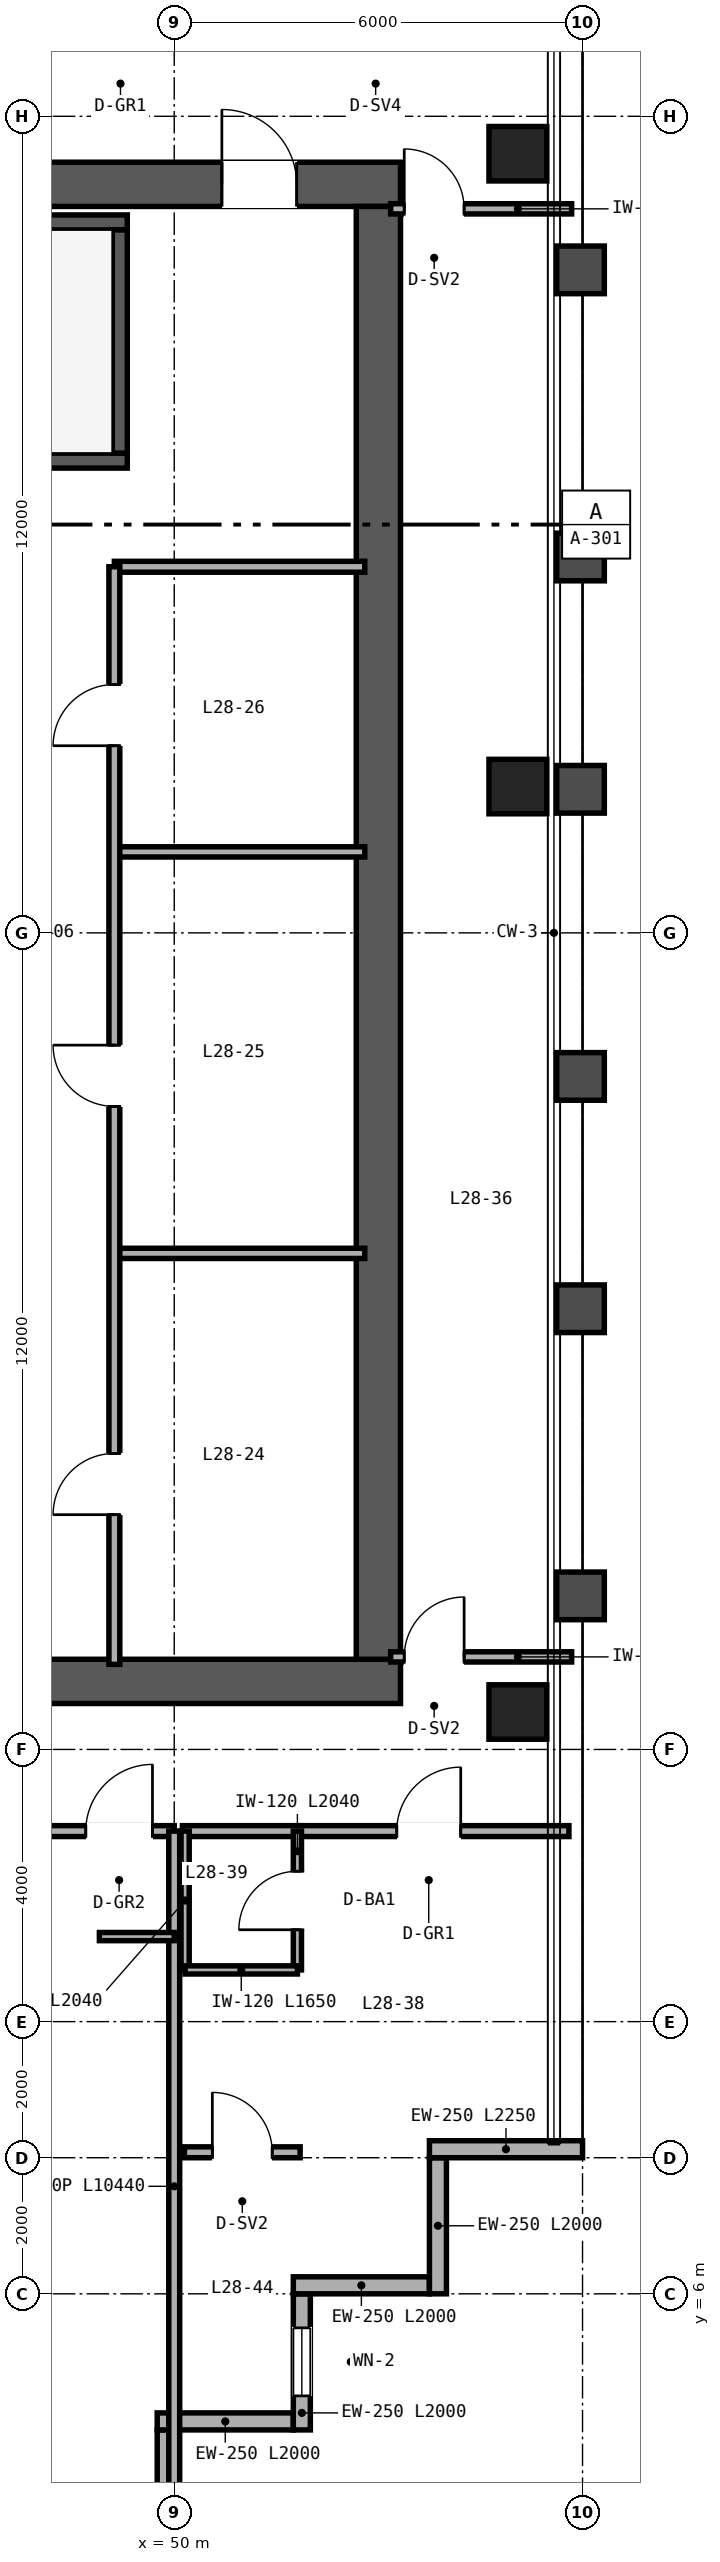
"""IFC4 building model, lengths in metres.
Left out: names, types, materials, properties, quantities, classifications, styles, units other than length and angle.
Written with IfcOpenShell. Run it as: python <this file> out.ifc"""

import sys

from ifc_helpers import new_model, si_unit, direction, frame, frame_2d, origin, origin_2d, place, context, subcontext, project, spatial, rectangle, hollow_rectangle, extrude, source, transform, mapped, element, fill, save


model = new_model("IFC4")
c1 = context("Model", 3, precision=1e-05, world=origin(), true_north=direction((0.0, 1.0)))
c2 = subcontext(c1, "Body", "Model", "MODEL_VIEW")
j1 = project(units=[si_unit("LENGTHUNIT", "METRE"), si_unit("PLANEANGLEUNIT", "RADIAN")], contexts=[c1])
p1 = place(None, origin())
s1 = spatial("IfcSite", under=j1, at=p1, CompositionType="ELEMENT")
p2 = place(p1, origin())
s2 = spatial("IfcBuilding", under=s1, at=p2, CompositionType="ELEMENT")
p3 = place(p2, frame((0.0, 0.0, 115.2)))
s3 = spatial("IfcBuildingStorey", under=s2, at=p3, CompositionType="ELEMENT", Elevation=115.2)
p4 = place(p3, frame((40.675, 15.0, 0.0), z_axis=(0.0, 0.0, 1.0), x_axis=(1.0, 0.0, 0.0)))
e1 = element("IfcWall", 1, at=p4, inside=s3, PredefinedType="SHEAR", context=c2, shape_type="SweptSolid", body=[
    extrude(rectangle(XDim=12.65, YDim=0.65, at=frame_2d((6.325, 0.0))), origin(), (0.0, 0.0, 1.0), 3.36),
])
p5 = place(p4, frame((4.425, 0.0, 0.0)))
e2 = element("IfcOpeningElement", 2, at=p5, cuts=e1, PredefinedType="OPENING", context=c2, shape_type="SweptSolid", body=[
    extrude(rectangle(XDim=1.0, YDim=2.15, at=frame_2d((0.5, 1.075))), frame((0.0, 0.335, 0.0), z_axis=(0.0, -1.0, 0.0), x_axis=(1.0, 0.0, 0.0)), (0.0, 0.0, 1.0), 0.67),
])
p6 = place(p3, frame((40.675, 37.0, 0.0), z_axis=(0.0, 0.0, 1.0), x_axis=(1.0, 0.0, 0.0)))
e3 = element("IfcWall", 3, at=p6, inside=s3, PredefinedType="SHEAR", context=c2, shape_type="SweptSolid", body=[
    extrude(rectangle(XDim=12.65, YDim=0.65, at=frame_2d((6.325, 0.0))), origin(), (0.0, 0.0, 1.0), 3.36),
])
p7 = place(p6, frame((10.025, 0.0, 0.0)))
e4 = element("IfcOpeningElement", 4, at=p7, cuts=e3, PredefinedType="OPENING", context=c2, shape_type="SweptSolid", body=[
    extrude(rectangle(XDim=1.1, YDim=2.15, at=frame_2d((0.55, 1.075))), frame((0.0, 0.335, 0.0), z_axis=(0.0, -1.0, 0.0), x_axis=(1.0, 0.0, 0.0)), (0.0, 0.0, 1.0), 0.67),
])
p8 = place(p3, frame((53.0, 15.325, 0.0), z_axis=(0.0, 0.0, 1.0), x_axis=(0.0, 1.0, 0.0)))
e5 = element("IfcWall", 5, at=p8, inside=s3, PredefinedType="SHEAR", context=c2, shape_type="SweptSolid", body=[
    extrude(rectangle(XDim=21.35, YDim=0.65, at=frame_2d((10.675, 0.0))), origin(), (0.0, 0.0, 1.0), 3.36),
])
p9 = place(p3, frame((41.325, 32.94, 0.0), z_axis=(0.0, 0.0, 1.0), x_axis=(1.0, 0.0, 0.0)))
e6 = element("IfcWall", 6, at=p9, inside=s3, PredefinedType="SHEAR", context=c2, shape_type="SweptSolid", body=[
    extrude(rectangle(XDim=7.985, YDim=0.22, at=frame_2d((3.993, 0.0))), origin(), (0.0, 0.0, 1.0), 3.4),
])
p10 = place(p9, frame((0.595, 0.0, 0.0)))
e7 = element("IfcOpeningElement", 7, at=p10, cuts=e6, PredefinedType="OPENING", context=c2, shape_type="SweptSolid", body=[
    extrude(rectangle(XDim=1.05, YDim=2.15, at=frame_2d((0.525, 1.075))), frame((0.0, 0.12, 0.0), z_axis=(0.0, -1.0, 0.0), x_axis=(1.0, 0.0, 0.0)), (0.0, 0.0, 1.0), 0.24),
])
p11 = place(p3, frame((41.325, 36.44, 0.0), z_axis=(0.0, 0.0, 1.0), x_axis=(1.0, 0.0, 0.0)))
e8 = element("IfcWall", 8, at=p11, inside=s3, PredefinedType="SHEAR", context=c2, shape_type="SweptSolid", body=[
    extrude(rectangle(XDim=7.985, YDim=0.22, at=frame_2d((3.993, 0.0))), origin(), (0.0, 0.0, 1.0), 3.4),
])
p12 = place(p3, frame((49.2, 33.05, 0.0), z_axis=(0.0, 0.0, 1.0), x_axis=(0.0, 1.0, 0.0)))
e9 = element("IfcWall", 9, at=p12, inside=s3, PredefinedType="SHEAR", context=c2, shape_type="SweptSolid", body=[
    extrude(rectangle(XDim=3.28, YDim=0.22, at=frame_2d((1.64, 0.0))), origin(), (0.0, 0.0, 1.0), 3.4),
])
m1 = source(origin(), c2, "Body", "SweptSolid", [
    extrude(hollow_rectangle(XDim=0.85, YDim=0.8, WallThickness=0.032, at=origin_2d()), origin(), (0.0, 0.0, 1.0), 3.36),
])
for number, where, z_axis, x_axis in (
    (10, (55.05, 14.55, 0.0), (0.0, 0.0, 1.0), (1.0, 0.0, 0.0)),
    (11, (55.05, 28.15, 0.0), (0.0, 0.0, 1.0), (1.0, 0.0, 0.0)),
    (12, (55.05, 37.45, 0.0), (0.0, 0.0, 1.0), (1.0, 0.0, 0.0)),
):
    element("IfcColumn", number, at=place(p3, frame(where, z_axis=z_axis, x_axis=x_axis)), inside=s3, PredefinedType="COLUMN", context=c2, shape_type="MappedRepresentation", body=[
        mapped(m1, transform((0.0, 0.0, 0.0), scale=1.0)),
    ])
p13 = place(p3, frame((49.875, 2.0, 0.0), z_axis=(0.0, 0.0, 1.0), x_axis=(0.0, 1.0, 0.0)))
e13 = element("IfcWall", 13, at=p13, inside=s3, PredefinedType="SOLIDWALL", context=c2, shape_type="SweptSolid", body=[
    extrude(rectangle(XDim=2.0, YDim=0.25, at=frame_2d((1.0, 0.0))), origin(), (0.0, 0.0, 1.0), 2.667),
])
p14 = place(p3, frame((49.75, 4.125, 0.0), z_axis=(0.0, 0.0, 1.0), x_axis=(1.0, 0.0, 0.0)))
e14 = element("IfcWall", 14, at=p14, inside=s3, PredefinedType="SOLIDWALL", context=c2, shape_type="SweptSolid", body=[
    extrude(rectangle(XDim=2.0, YDim=0.25, at=frame_2d((1.0, 0.0))), origin(), (0.0, 0.0, 1.0), 3.36),
])
p15 = place(p3, frame((51.875, 4.0, 0.0), z_axis=(0.0, 0.0, 1.0), x_axis=(0.0, 1.0, 0.0)))
e15 = element("IfcWall", 15, at=p15, inside=s3, PredefinedType="SOLIDWALL", context=c2, shape_type="SweptSolid", body=[
    extrude(rectangle(XDim=2.0, YDim=0.25, at=frame_2d((1.0, 0.0))), origin(), (0.0, 0.0, 1.0), 3.36),
])
p16 = place(p15, frame((0.5, 0.0, 0.85)))
e16 = element("IfcOpeningElement", 16, at=p16, cuts=e15, PredefinedType="OPENING", context=c2, shape_type="SweptSolid", body=[
    extrude(rectangle(XDim=1.0, YDim=1.9, at=frame_2d((0.5, 0.95))), frame((0.0, 0.135, 0.0), z_axis=(0.0, -1.0, 0.0), x_axis=(1.0, 0.0, 0.0)), (0.0, 0.0, 1.0), 0.27),
])
for number, where, z_axis, x_axis in (
    (17, (51.75, 6.125, 0.0), (0.0, 0.0, 1.0), (1.0, 0.0, 0.0)),
    (18, (53.875, 6.0, 0.0), (0.0, 0.0, 1.0), (0.0, 1.0, 0.0)),
):
    element("IfcWall", number, at=place(p3, frame(where, z_axis=z_axis, x_axis=x_axis)), inside=s3, PredefinedType="SOLIDWALL", context=c2, shape_type="SweptSolid", body=[
        extrude(rectangle(XDim=2.0, YDim=0.25, at=frame_2d((1.0, 0.0))), origin(), (0.0, 0.0, 1.0), 3.36),
    ])
p17 = place(p3, frame((53.75, 8.125, 0.0), z_axis=(0.0, 0.0, 1.0), x_axis=(1.0, 0.0, 0.0)))
e19 = element("IfcWall", 19, at=p17, inside=s3, PredefinedType="SOLIDWALL", context=c2, shape_type="SweptSolid", body=[
    extrude(rectangle(XDim=2.25, YDim=0.25, at=frame_2d((1.125, 0.0))), origin(), (0.0, 0.0, 1.0), 3.36),
])
p18 = place(p3, frame((49.12, 31.38, 0.0), z_axis=(0.0, 0.0, 1.0), x_axis=(1.0, 0.0, 0.0)))
e20 = element("IfcWall", 20, at=p18, inside=s3, PredefinedType="PARTITIONING", context=c2, shape_type="SweptSolid", body=[
    extrude(rectangle(XDim=3.68, YDim=0.16, at=frame_2d((1.84, 0.0))), origin(), (0.0, 0.0, 1.0), 2.36),
])
for number, where, z_axis, x_axis in (
    (21, (49.12, 21.29, 0.0), (0.0, 0.0, 1.0), (1.0, 0.0, 0.0)),
    (22, (49.12, 27.19, 0.0), (0.0, 0.0, 1.0), (1.0, 0.0, 0.0)),
):
    element("IfcWall", number, at=place(p3, frame(where, z_axis=z_axis, x_axis=x_axis)), inside=s3, PredefinedType="PARTITIONING", context=c2, shape_type="SweptSolid", body=[
        extrude(rectangle(XDim=3.68, YDim=0.15, at=frame_2d((1.84, 0.0))), origin(), (0.0, 0.0, 1.0), 3.36),
    ])
p19 = place(p3, frame((49.12, 15.25, 0.0), z_axis=(0.0, 0.0, 1.0), x_axis=(0.0, 1.0, 0.0)))
e23 = element("IfcWall", 23, at=p19, inside=s3, PredefinedType="PARTITIONING", context=c2, shape_type="SweptSolid", body=[
    extrude(rectangle(XDim=16.13, YDim=0.16, at=frame_2d((8.065, 0.0))), origin(), (0.0, 0.0, 1.0), 2.36),
])
p20 = place(p19, frame((2.2, 0.0, 0.0)))
e24 = element("IfcOpeningElement", 24, at=p20, cuts=e23, PredefinedType="OPENING", context=c2, shape_type="SweptSolid", body=[
    extrude(rectangle(XDim=0.9, YDim=2.15, at=frame_2d((0.45, 1.075))), frame((0.0, 0.09, 0.0), z_axis=(0.0, -1.0, 0.0), x_axis=(1.0, 0.0, 0.0)), (0.0, 0.0, 1.0), 0.18),
])
p21 = place(p19, frame((8.2, 0.0, 0.0)))
e25 = element("IfcOpeningElement", 25, at=p21, cuts=e23, PredefinedType="OPENING", context=c2, shape_type="SweptSolid", body=[
    extrude(rectangle(XDim=0.9, YDim=2.15, at=frame_2d((0.45, 1.075))), frame((0.0, 0.09, 0.0), z_axis=(0.0, -1.0, 0.0), x_axis=(1.0, 0.0, 0.0)), (0.0, 0.0, 1.0), 0.18),
])
p22 = place(p19, frame((13.5, 0.0, 0.0)))
e26 = element("IfcOpeningElement", 26, at=p22, cuts=e23, PredefinedType="OPENING", context=c2, shape_type="SweptSolid", body=[
    extrude(rectangle(XDim=0.9, YDim=2.15, at=frame_2d((0.45, 1.075))), frame((0.0, 0.09, 0.0), z_axis=(0.0, -1.0, 0.0), x_axis=(1.0, 0.0, 0.0)), (0.0, 0.0, 1.0), 0.18),
])
p23 = place(p3, frame((53.18, 15.36, 0.0), z_axis=(0.0, 0.0, 1.0), x_axis=(1.0, 0.0, 0.0)))
e27 = element("IfcWall", 27, at=p23, inside=s3, PredefinedType="PARTITIONING", context=c2, shape_type="SweptSolid", body=[
    extrude(rectangle(XDim=2.66, YDim=0.15, at=frame_2d((1.33, 0.0))), origin(), (0.0, 0.0, 1.0), 2.581),
])
p24 = place(p23, frame((0.2, 0.0, 0.0)))
e28 = element("IfcOpeningElement", 28, at=p24, cuts=e27, PredefinedType="OPENING", context=c2, shape_type="SweptSolid", body=[
    extrude(rectangle(XDim=0.88, YDim=2.15, at=frame_2d((0.44, 1.075))), frame((0.0, 0.085, 0.0), z_axis=(0.0, -1.0, 0.0), x_axis=(1.0, 0.0, 0.0)), (0.0, 0.0, 1.0), 0.17),
])
p25 = place(p3, frame((53.18, 36.64, 0.0), z_axis=(0.0, 0.0, 1.0), x_axis=(1.0, 0.0, 0.0)))
e29 = element("IfcWall", 29, at=p25, inside=s3, PredefinedType="PARTITIONING", context=c2, shape_type="SweptSolid", body=[
    extrude(rectangle(XDim=2.66, YDim=0.15, at=frame_2d((1.33, 0.0))), origin(), (0.0, 0.0, 1.0), 2.743),
])
p26 = place(p25, frame((0.2, 0.0, 0.0)))
e30 = element("IfcOpeningElement", 30, at=p26, cuts=e29, PredefinedType="OPENING", context=c2, shape_type="SweptSolid", body=[
    extrude(rectangle(XDim=0.88, YDim=2.15, at=frame_2d((0.44, 1.075))), frame((0.0, 0.085, 0.0), z_axis=(0.0, -1.0, 0.0), x_axis=(1.0, 0.0, 0.0)), (0.0, 0.0, 1.0), 0.17),
])
p27 = place(p3, frame((50.12, 12.8, 0.0), z_axis=(0.0, 0.0, 1.0), x_axis=(1.0, 0.0, 0.0)))
e31 = element("IfcWall", 31, at=p27, inside=s3, PredefinedType="PARTITIONING", context=c2, shape_type="SweptSolid", body=[
    extrude(rectangle(XDim=5.68, YDim=0.16, at=frame_2d((2.84, 0.0))), origin(), (0.0, 0.0, 1.0), 3.36),
])
p28 = place(p27, frame((3.15, 0.0, 0.0)))
e32 = element("IfcOpeningElement", 32, at=p28, cuts=e31, PredefinedType="OPENING", context=c2, shape_type="SweptSolid", body=[
    extrude(rectangle(XDim=0.94, YDim=2.15, at=frame_2d((0.47, 1.075))), frame((0.0, 0.09, 0.0), z_axis=(0.0, -1.0, 0.0), x_axis=(1.0, 0.0, 0.0)), (0.0, 0.0, 1.0), 0.18),
])
p29 = place(p3, frame((51.81, 10.76, 0.0), z_axis=(0.0, 0.0, 1.0), x_axis=(0.0, 1.0, 0.0)))
e33 = element("IfcWall", 33, at=p29, inside=s3, PredefinedType="PARTITIONING", context=c2, shape_type="SweptSolid", body=[
    extrude(rectangle(XDim=2.04, YDim=0.12, at=frame_2d((1.02, 0.0))), origin(), (0.0, 0.0, 1.0), 3.36),
])
p30 = place(p29, frame((0.59, 0.0, 0.0)))
e34 = element("IfcOpeningElement", 34, at=p30, cuts=e33, PredefinedType="OPENING", context=c2, shape_type="SweptSolid", body=[
    extrude(rectangle(XDim=0.86, YDim=2.1, at=frame_2d((0.43, 1.05))), frame((0.0, 0.07, 0.0), z_axis=(0.0, -1.0, 0.0), x_axis=(1.0, 0.0, 0.0)), (0.0, 0.0, 1.0), 0.14),
])
p31 = place(p3, frame((50.16, 10.76, 0.0), z_axis=(0.0, 0.0, 1.0), x_axis=(0.0, 1.0, 0.0)))
e35 = element("IfcWall", 35, at=p31, inside=s3, PredefinedType="PARTITIONING", context=c2, shape_type="SweptSolid", body=[
    extrude(rectangle(XDim=2.04, YDim=0.12, at=frame_2d((1.02, 0.0))), origin(), (0.0, 0.0, 1.0), 3.36),
])
p32 = place(p3, frame((50.16, 10.76, 0.0), z_axis=(0.0, 0.0, 1.0), x_axis=(1.0, 0.0, 0.0)))
e36 = element("IfcWall", 36, at=p32, inside=s3, PredefinedType="PARTITIONING", context=c2, shape_type="SweptSolid", body=[
    extrude(rectangle(XDim=1.65, YDim=0.12, at=frame_2d((0.825, 0.0))), origin(), (0.0, 0.0, 1.0), 3.36),
])
p33 = place(p3, frame((50.15, 8.08, 0.0), z_axis=(0.0, 0.0, 1.0), x_axis=(1.0, 0.0, 0.0)))
e37 = element("IfcWall", 37, at=p33, inside=s3, PredefinedType="PARTITIONING", context=c2, shape_type="SweptSolid", body=[
    extrude(rectangle(XDim=1.7, YDim=0.16, at=frame_2d((0.85, 0.0))), origin(), (0.0, 0.0, 1.0), 3.36),
])
p34 = place(p33, frame((0.41, 0.0, 0.0)))
e38 = element("IfcOpeningElement", 38, at=p34, cuts=e37, PredefinedType="OPENING", context=c2, shape_type="SweptSolid", body=[
    extrude(rectangle(XDim=0.88, YDim=2.15, at=frame_2d((0.44, 1.075))), frame((0.0, 0.09, 0.0), z_axis=(0.0, -1.0, 0.0), x_axis=(1.0, 0.0, 0.0)), (0.0, 0.0, 1.0), 0.18),
])
p35 = place(p3, frame((14.0, 12.8, 0.0), z_axis=(0.0, 0.0, 1.0), x_axis=(1.0, 0.0, 0.0)))
e39 = element("IfcWall", 39, at=p35, inside=s3, PredefinedType="PARTITIONING", context=c2, shape_type="SweptSolid", body=[
    extrude(rectangle(XDim=36.0, YDim=0.16, at=frame_2d((18.0, 0.0))), origin(), (0.0, 0.0, 1.0), 2.581),
])
p36 = place(p35, frame((7.75, 0.0, 0.0)))
e40 = element("IfcOpeningElement", 40, at=p36, cuts=e39, PredefinedType="OPENING", context=c2, shape_type="SweptSolid", body=[
    extrude(rectangle(XDim=0.98, YDim=2.2, at=frame_2d((0.49, 1.1))), frame((0.0, 0.09, 0.0), z_axis=(0.0, -1.0, 0.0), x_axis=(1.0, 0.0, 0.0)), (0.0, 0.0, 1.0), 0.18),
])
p37 = place(p35, frame((16.9, 0.0, 0.0)))
e41 = element("IfcOpeningElement", 41, at=p37, cuts=e39, PredefinedType="OPENING", context=c2, shape_type="SweptSolid", body=[
    extrude(rectangle(XDim=0.98, YDim=2.2, at=frame_2d((0.49, 1.1))), frame((0.0, 0.09, 0.0), z_axis=(0.0, -1.0, 0.0), x_axis=(1.0, 0.0, 0.0)), (0.0, 0.0, 1.0), 0.18),
])
p38 = place(p35, frame((24.65, 0.0, 0.0)))
e42 = element("IfcOpeningElement", 42, at=p38, cuts=e39, PredefinedType="OPENING", context=c2, shape_type="SweptSolid", body=[
    extrude(rectangle(XDim=0.98, YDim=2.2, at=frame_2d((0.49, 1.1))), frame((0.0, 0.09, 0.0), z_axis=(0.0, -1.0, 0.0), x_axis=(1.0, 0.0, 0.0)), (0.0, 0.0, 1.0), 0.18),
])
p39 = place(p35, frame((34.7, 0.0, 0.0)))
e43 = element("IfcOpeningElement", 43, at=p39, cuts=e39, PredefinedType="OPENING", context=c2, shape_type="SweptSolid", body=[
    extrude(rectangle(XDim=0.98, YDim=2.2, at=frame_2d((0.49, 1.1))), frame((0.0, 0.09, 0.0), z_axis=(0.0, -1.0, 0.0), x_axis=(1.0, 0.0, 0.0)), (0.0, 0.0, 1.0), 0.18),
])
p40 = place(p3, frame((50.0, 2.36, 0.0), z_axis=(0.0, 0.0, 1.0), x_axis=(0.0, 1.0, 0.0)))
e44 = element("IfcWall", 44, at=p40, inside=s3, PredefinedType="PARTITIONING", context=c2, shape_type="SweptSolid", body=[
    extrude(rectangle(XDim=10.44, YDim=0.16, at=frame_2d((5.22, 0.0))), origin(), (0.0, 0.0, 1.0), 2.667),
])
p41 = place(p3, frame((48.9, 11.25, 0.0), z_axis=(0.0, 0.0, 1.0), x_axis=(1.0, 0.0, 0.0)))
e45 = element("IfcWall", 45, at=p41, inside=s3, PredefinedType="PARTITIONING", context=c2, shape_type="SweptSolid", body=[
    extrude(rectangle(XDim=1.1, YDim=0.12, at=frame_2d((0.55, 0.0))), origin(), (0.0, 0.0, 1.0), 3.36),
])
m2 = source(origin(), c2, "Body", "SweptSolid", [
    extrude(rectangle(XDim=1.0, YDim=1.9, at=frame_2d((0.5, 0.95))), frame((0.0, 0.03, 0.0), z_axis=(0.0, -1.0, 0.0), x_axis=(1.0, 0.0, 0.0)), (0.0, 0.0, 1.0), 0.06),
])
p42 = place(p16, origin())
e46 = element("IfcWindow", 46, at=p42, inside=s3, PartitioningType="SINGLE_PANEL", PredefinedType="WINDOW", context=c2, shape_type="MappedRepresentation", body=[
    mapped(m2, transform((0.0, 0.0, 0.0), scale=1.0)),
])
fill(e16, e46)
m3 = source(origin(), c2, "Body", "SweptSolid", [
    extrude(rectangle(XDim=1.1, YDim=2.15, at=frame_2d((0.55, 1.075))), frame((0.0, 0.025, 0.0), z_axis=(0.0, -1.0, 0.0), x_axis=(1.0, 0.0, 0.0)), (0.0, 0.0, 1.0), 0.05),
])
p43 = place(p7, origin())
e47 = element("IfcDoor", 47, at=p43, inside=s3, OperationType="SINGLE_SWING_LEFT", PredefinedType="DOOR", context=c2, shape_type="MappedRepresentation", body=[
    mapped(m3, transform((0.0, 0.0, 0.0), scale=1.0)),
])
fill(e4, e47)
m4 = source(origin(), c2, "Body", "SweptSolid", [
    extrude(rectangle(XDim=0.9, YDim=2.15, at=frame_2d((0.45, 1.075))), frame((0.0, 0.025, 0.0), z_axis=(0.0, -1.0, 0.0), x_axis=(1.0, 0.0, 0.0)), (0.0, 0.0, 1.0), 0.05),
])
p44 = place(p20, origin())
e48 = element("IfcDoor", 48, at=p44, inside=s3, OperationType="SINGLE_SWING_LEFT", PredefinedType="DOOR", context=c2, shape_type="MappedRepresentation", body=[
    mapped(m4, transform((0.0, 0.0, 0.0), scale=1.0)),
])
fill(e24, e48)
p45 = place(p21, origin())
e49 = element("IfcDoor", 49, at=p45, inside=s3, OperationType="SINGLE_SWING_RIGHT", PredefinedType="DOOR", context=c2, shape_type="MappedRepresentation", body=[
    mapped(m4, transform((0.0, 0.0, 0.0), scale=1.0)),
])
fill(e25, e49)
p46 = place(p22, origin())
e50 = element("IfcDoor", 50, at=p46, inside=s3, OperationType="SINGLE_SWING_LEFT", PredefinedType="DOOR", context=c2, shape_type="MappedRepresentation", body=[
    mapped(m4, transform((0.0, 0.0, 0.0), scale=1.0)),
])
fill(e26, e50)
m5 = source(origin(), c2, "Body", "SweptSolid", [
    extrude(rectangle(XDim=0.88, YDim=2.15, at=frame_2d((0.44, 1.075))), frame((0.0, 0.025, 0.0), z_axis=(0.0, -1.0, 0.0), x_axis=(1.0, 0.0, 0.0)), (0.0, 0.0, 1.0), 0.05),
])
p47 = place(p24, origin())
e51 = element("IfcDoor", 51, at=p47, inside=s3, OperationType="SINGLE_SWING_RIGHT", PredefinedType="DOOR", context=c2, shape_type="MappedRepresentation", body=[
    mapped(m5, transform((0.0, 0.0, 0.0), scale=1.0)),
])
fill(e28, e51)
p48 = place(p26, origin())
e52 = element("IfcDoor", 52, at=p48, inside=s3, OperationType="SINGLE_SWING_LEFT", PredefinedType="DOOR", context=c2, shape_type="MappedRepresentation", body=[
    mapped(m5, transform((0.0, 0.0, 0.0), scale=1.0)),
])
fill(e30, e52)
m6 = source(origin(), c2, "Body", "SweptSolid", [
    extrude(rectangle(XDim=0.86, YDim=2.1, at=frame_2d((0.43, 1.05))), frame((0.0, 0.025, 0.0), z_axis=(0.0, -1.0, 0.0), x_axis=(1.0, 0.0, 0.0)), (0.0, 0.0, 1.0), 0.05),
])
p49 = place(p30, origin())
e53 = element("IfcDoor", 53, at=p49, inside=s3, OperationType="SINGLE_SWING_LEFT", PredefinedType="DOOR", context=c2, shape_type="MappedRepresentation", body=[
    mapped(m6, transform((0.0, 0.0, 0.0), scale=1.0)),
])
fill(e34, e53)
m7 = source(origin(), c2, "Body", "SweptSolid", [
    extrude(rectangle(XDim=0.94, YDim=2.15, at=frame_2d((0.47, 1.075))), frame((0.0, 0.025, 0.0), z_axis=(0.0, -1.0, 0.0), x_axis=(1.0, 0.0, 0.0)), (0.0, 0.0, 1.0), 0.05),
])
p50 = place(p28, origin())
e54 = element("IfcDoor", 54, at=p50, inside=s3, OperationType="SINGLE_SWING_RIGHT", PredefinedType="DOOR", context=c2, shape_type="MappedRepresentation", body=[
    mapped(m7, transform((0.0, 0.0, 0.0), scale=1.0)),
])
fill(e32, e54)
p51 = place(p34, origin())
e55 = element("IfcDoor", 55, at=p51, inside=s3, OperationType="SINGLE_SWING_LEFT", PredefinedType="DOOR", context=c2, shape_type="MappedRepresentation", body=[
    mapped(m5, transform((0.0, 0.0, 0.0), scale=1.0)),
])
fill(e38, e55)
m8 = source(origin(), c2, "Body", "SweptSolid", [
    extrude(rectangle(XDim=0.98, YDim=2.2, at=frame_2d((0.49, 1.1))), frame((0.0, 0.025, 0.0), z_axis=(0.0, -1.0, 0.0), x_axis=(1.0, 0.0, 0.0)), (0.0, 0.0, 1.0), 0.05),
])
p52 = place(p39, origin())
e56 = element("IfcDoor", 56, at=p52, inside=s3, OperationType="SINGLE_SWING_RIGHT", PredefinedType="DOOR", context=c2, shape_type="MappedRepresentation", body=[
    mapped(m8, transform((0.0, 0.0, 0.0), scale=1.0)),
])
fill(e43, e56)
save(model, sys.argv[1])
